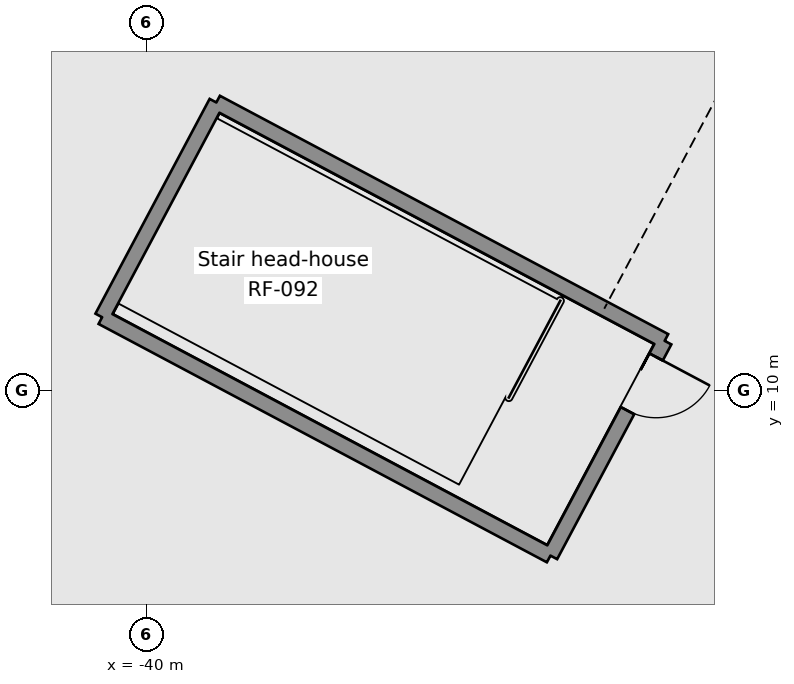
"""IFC4 building model, lengths in metres.
Left out: names, types, materials, properties, quantities, classifications, styles, units other than length and angle.
Written with IfcOpenShell. Run it as: python <this file> out.ifc"""

import sys

from ifc_helpers import new_model, si_unit, direction, frame, frame_2d, origin, place, context, subcontext, project, spatial, rectangle, extrude, element, fill, save


model = new_model("IFC4")
c1 = context("Model", 3, precision=1e-05, world=origin(), true_north=direction((0.0, 1.0)))
c2 = subcontext(c1, "Body", "Model", "MODEL_VIEW")
j1 = project(units=[si_unit("LENGTHUNIT", "METRE"), si_unit("PLANEANGLEUNIT", "RADIAN")], contexts=[c1])
p1 = place(None, origin())
s1 = spatial("IfcSite", under=j1, at=p1, CompositionType="ELEMENT")
p2 = place(p1, origin())
s2 = spatial("IfcBuilding", under=s1, at=p2, CompositionType="ELEMENT")
p3 = place(p2, frame((0.0, 0.0, 357.6)))
s3 = spatial("IfcBuildingStorey", under=s2, at=p3, CompositionType="ELEMENT", Elevation=357.6)
p4 = place(p3, frame((-38.853, 14.74, 0.0), z_axis=(0.0, 0.0, 1.0), x_axis=(0.882960840913, -0.469446645972, 0.0)))
e1 = element("IfcWall", 1, at=p4, inside=s3, PredefinedType="STANDARD", context=c2, shape_type="SweptSolid", body=[
    extrude(rectangle(XDim=8.35, YDim=0.25, at=frame_2d((4.175, 0.0))), origin(), (0.0, 0.0, 1.0), 3.2),
])
p5 = place(p3, frame((-31.48, 10.821, 0.0), z_axis=(0.0, 0.0, 1.0), x_axis=(-0.46950770601, -0.882928374217, 0.0)))
e2 = element("IfcWall", 2, at=p5, inside=s3, PredefinedType="STANDARD", context=c2, shape_type="SweptSolid", body=[
    extrude(rectangle(XDim=4.0, YDim=0.25, at=frame_2d((2.0, 0.0))), origin(), (0.0, 0.0, 1.0), 3.2),
])
p6 = place(p5, frame((0.3, 0.0, 0.0)))
e3 = element("IfcOpeningElement", 3, at=p6, cuts=e2, PredefinedType="OPENING", context=c2, shape_type="SweptSolid", body=[
    extrude(rectangle(XDim=1.0, YDim=2.1, at=frame_2d((0.5, 1.05))), frame((0.0, 0.135, 0.0), z_axis=(0.0, -1.0, 0.0), x_axis=(1.0, 0.0, 0.0)), (0.0, 0.0, 1.0), 0.27),
])
p7 = place(p3, frame((-33.358, 7.289, 0.0), z_axis=(0.0, 0.0, 1.0), x_axis=(-0.882942277232, 0.469481559889, 0.0)))
e4 = element("IfcWall", 4, at=p7, inside=s3, PredefinedType="STANDARD", context=c2, shape_type="SweptSolid", body=[
    extrude(rectangle(XDim=8.35, YDim=0.25, at=frame_2d((4.175, 0.0))), origin(), (0.0, 0.0, 1.0), 3.2),
])
p8 = place(p3, frame((-40.73, 11.209, 0.0), z_axis=(0.0, 0.0, 1.0), x_axis=(0.469485426614, 0.882940221191, 0.0)))
e5 = element("IfcWall", 5, at=p8, inside=s3, PredefinedType="STANDARD", context=c2, shape_type="SweptSolid", body=[
    extrude(rectangle(XDim=4.0, YDim=0.25, at=frame_2d((2.0, 0.0))), origin(), (0.0, 0.0, 1.0), 3.2),
])
p9 = place(p6, origin())
e6 = element("IfcDoor", 6, at=p9, inside=s3, OperationType="SINGLE_SWING_LEFT", PredefinedType="DOOR", context=c2, shape_type="SweptSolid", body=[
    extrude(rectangle(XDim=1.0, YDim=2.1, at=frame_2d((0.5, 1.05))), frame((0.0, 0.025, 0.0), z_axis=(0.0, -1.0, 0.0), x_axis=(1.0, 0.0, 0.0)), (0.0, 0.0, 1.0), 0.05),
])
fill(e3, e6)
save(model, sys.argv[1])
